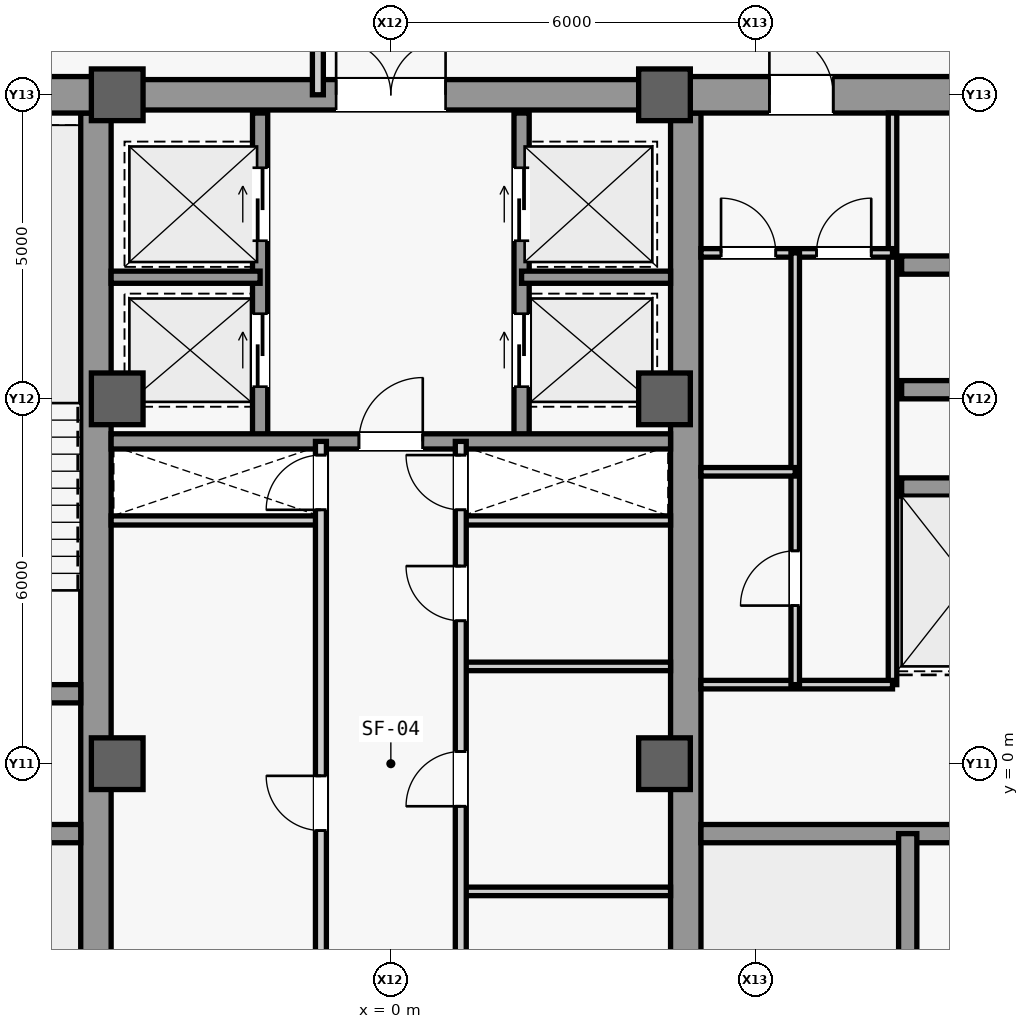
"""IFC4 building model, lengths in metres.
Left out: names, types, materials, properties, quantities, classifications, styles, units other than length and angle.
Written with IfcOpenShell. Run it as: python <this file> out.ifc"""

import sys

from ifc_helpers import new_model, si_unit, direction, frame, frame_2d, origin, origin_2d, place, context, subcontext, project, spatial, rectangle, extrude, source, transform, mapped, element, fill, save


model = new_model("IFC4")
c1 = context("Model", 3, precision=1e-05, world=origin(), true_north=direction((0.0, 1.0)))
c2 = subcontext(c1, "Body", "Model", "MODEL_VIEW")
j1 = project(units=[si_unit("LENGTHUNIT", "METRE"), si_unit("PLANEANGLEUNIT", "RADIAN")], contexts=[c1])
p1 = place(None, origin())
s1 = spatial("IfcSite", under=j1, at=p1, CompositionType="ELEMENT")
p2 = place(p1, origin())
s2 = spatial("IfcBuilding", under=s1, at=p2, CompositionType="ELEMENT")
p3 = place(p2, frame((0.0, 0.0, 223.1)))
s3 = spatial("IfcBuildingStorey", under=s2, at=p3, CompositionType="ELEMENT", Elevation=223.1)
m1 = source(origin(), c2, "Body", "SweptSolid", [
    extrude(rectangle(XDim=21.4, YDim=0.5, at=frame_2d((10.7, 0.0))), origin(), (0.0, 0.0, 1.0), 3.78),
])
for number, where, z_axis, x_axis in (
    (1, (-4.85, -10.7, 0.0), (0.0, 0.0, 1.0), (0.0, 1.0, 0.0)),
    (2, (4.85, -10.7, 0.0), (0.0, 0.0, 1.0), (0.0, 1.0, 0.0)),
):
    element("IfcWall", number, at=place(p3, frame(where, z_axis=z_axis, x_axis=x_axis)), inside=s3, PredefinedType="SHEAR", context=c2, shape_type="MappedRepresentation", body=[
        mapped(m1, transform((0.0, 0.0, 0.0), scale=1.0)),
    ])
m2 = source(origin(), c2, "Body", "SweptSolid", [
    extrude(rectangle(XDim=5.9, YDim=0.6, at=frame_2d((2.95, 0.0))), origin(), (0.0, 0.0, 1.0), 3.78),
])
p4 = place(p3, frame((-10.75, 11.0, 0.0), z_axis=(0.0, 0.0, 1.0), x_axis=(1.0, 0.0, 0.0)))
e3 = element("IfcWall", 3, at=p4, inside=s3, PredefinedType="SHEAR", context=c2, shape_type="MappedRepresentation", body=[
    mapped(m2, transform((0.0, 0.0, 0.0), scale=1.0)),
])
p5 = place(p3, frame((4.85, 11.0, 0.0), z_axis=(0.0, 0.0, 1.0), x_axis=(1.0, 0.0, 0.0)))
e4 = element("IfcWall", 4, at=p5, inside=s3, PredefinedType="SHEAR", context=c2, shape_type="MappedRepresentation", body=[
    mapped(m2, transform((0.0, 0.0, 0.0), scale=1.0)),
])
m3 = source(origin(), c2, "Body", "SweptSolid", [
    extrude(rectangle(XDim=1.05, YDim=2.2, at=frame_2d((0.525, 1.1))), frame((0.0, 0.31, 0.0), z_axis=(0.0, -1.0, 0.0), x_axis=(1.0, 0.0, 0.0)), (0.0, 0.0, 1.0), 0.62),
])
p6 = place(p5, frame((1.375, 0.0, 0.0)))
e5 = element("IfcOpeningElement", 5, at=p6, cuts=e4, PredefinedType="OPENING", context=c2, shape_type="MappedRepresentation", body=[
    mapped(m3, transform((0.0, 0.0, 0.0), scale=1.0)),
])
m4 = source(origin(), c2, "Body", "SweptSolid", [
    extrude(rectangle(XDim=5.65, YDim=0.3, at=frame_2d((2.825, 0.0))), origin(), (0.0, 0.0, 1.0), 3.78),
])
for number, where, z_axis, x_axis in (
    (6, (-10.75, -1.15, 0.0), (0.0, 0.0, 1.0), (1.0, 0.0, 0.0)),
    (7, (-10.75, 1.15, 0.0), (0.0, 0.0, 1.0), (1.0, 0.0, 0.0)),
    (8, (5.1, -1.15, 0.0), (0.0, 0.0, 1.0), (1.0, 0.0, 0.0)),
):
    element("IfcWall", number, at=place(p3, frame(where, z_axis=z_axis, x_axis=x_axis)), inside=s3, PredefinedType="SHEAR", context=c2, shape_type="MappedRepresentation", body=[
        mapped(m4, transform((0.0, 0.0, 0.0), scale=1.0)),
    ])
m5 = source(origin(), c2, "Body", "SweptSolid", [
    extrude(rectangle(XDim=9.2, YDim=0.5, at=frame_2d((4.6, 0.0))), origin(), (0.0, 0.0, 1.0), 3.78),
])
p7 = place(p3, frame((-4.6, 11.0, 0.0), z_axis=(0.0, 0.0, 1.0), x_axis=(1.0, 0.0, 0.0)))
e9 = element("IfcWall", 9, at=p7, inside=s3, PredefinedType="SHEAR", context=c2, shape_type="MappedRepresentation", body=[
    mapped(m5, transform((0.0, 0.0, 0.0), scale=1.0)),
])
m6 = source(origin(), c2, "Body", "SweptSolid", [
    extrude(rectangle(XDim=1.8, YDim=2.25, at=frame_2d((0.9, 1.125))), frame((0.0, 0.26, 0.0), z_axis=(0.0, -1.0, 0.0), x_axis=(1.0, 0.0, 0.0)), (0.0, 0.0, 1.0), 0.52),
])
p8 = place(p7, frame((3.7, 0.0, 0.0)))
e10 = element("IfcOpeningElement", 10, at=p8, cuts=e9, PredefinedType="OPENING", context=c2, shape_type="MappedRepresentation", body=[
    mapped(m6, transform((0.0, 0.0, 0.0), scale=1.0)),
])
m7 = source(origin(), c2, "Body", "SweptSolid", [
    extrude(rectangle(XDim=0.85, YDim=0.85, at=origin_2d()), origin(), (0.0, 0.0, 1.0), 4.0),
])
for number, where, z_axis, x_axis in (
    (11, (-4.5, 0.0, 0.0), (0.0, 0.0, 1.0), (1.0, 0.0, 0.0)),
    (12, (-4.5, 6.0, 0.0), (0.0, 0.0, 1.0), (1.0, 0.0, 0.0)),
    (13, (-4.5, 11.0, 0.0), (0.0, 0.0, 1.0), (1.0, 0.0, 0.0)),
    (14, (4.5, 0.0, 0.0), (0.0, 0.0, 1.0), (1.0, 0.0, 0.0)),
    (15, (4.5, 6.0, 0.0), (0.0, 0.0, 1.0), (1.0, 0.0, 0.0)),
    (16, (4.5, 11.0, 0.0), (0.0, 0.0, 1.0), (1.0, 0.0, 0.0)),
):
    element("IfcColumn", number, at=place(p3, frame(where, z_axis=z_axis, x_axis=x_axis)), inside=s3, PredefinedType="COLUMN", context=c2, shape_type="MappedRepresentation", body=[
        mapped(m7, transform((0.0, 0.0, 0.0), scale=1.0)),
    ])
m8 = source(origin(), c2, "Body", "SweptSolid", [
    extrude(rectangle(XDim=7.8, YDim=0.3, at=frame_2d((3.9, 0.0))), origin(), (0.0, 0.0, 1.0), 3.78),
])
p9 = place(p3, frame((8.5, -8.95, 0.0), z_axis=(0.0, 0.0, 1.0), x_axis=(0.0, 1.0, 0.0)))
e17 = element("IfcWall", 17, at=p9, inside=s3, PredefinedType="SHEAR", context=c2, shape_type="MappedRepresentation", body=[
    mapped(m8, transform((0.0, 0.0, 0.0), scale=1.0)),
])
m9 = source(origin(), c2, "Body", "SweptSolid", [
    extrude(rectangle(XDim=2.3, YDim=0.3, at=frame_2d((1.15, 0.0))), origin(), (0.0, 0.0, 1.0), 3.78),
])
for number, where, z_axis, x_axis in (
    (18, (8.4, 4.55, 0.0), (0.0, 0.0, 1.0), (1.0, 0.0, 0.0)),
    (19, (8.4, 6.15, 0.0), (0.0, 0.0, 1.0), (1.0, 0.0, 0.0)),
    (20, (8.4, 8.2, 0.0), (0.0, 0.0, 1.0), (1.0, 0.0, 0.0)),
):
    element("IfcWall", number, at=place(p3, frame(where, z_axis=z_axis, x_axis=x_axis)), inside=s3, PredefinedType="SHEAR", context=c2, shape_type="MappedRepresentation", body=[
        mapped(m9, transform((0.0, 0.0, 0.0), scale=1.0)),
    ])
m10 = source(origin(), c2, "Body", "SweptSolid", [
    extrude(rectangle(XDim=9.4, YDim=0.14, at=frame_2d((4.7, 0.0))), origin(), (0.0, 0.0, 1.0), 3.78),
])
p10 = place(p3, frame((8.25, 1.3, 0.0), z_axis=(0.0, 0.0, 1.0), x_axis=(0.0, 1.0, 0.0)))
e21 = element("IfcWall", 21, at=p10, inside=s3, PredefinedType="PARTITIONING", context=c2, shape_type="MappedRepresentation", body=[
    mapped(m10, transform((0.0, 0.0, 0.0), scale=1.0)),
])
m11 = source(origin(), c2, "Body", "SweptSolid", [
    extrude(rectangle(XDim=3.15, YDim=0.14, at=frame_2d((1.575, 0.0))), origin(), (0.0, 0.0, 1.0), 3.78),
])
p11 = place(p3, frame((5.1, 1.3, 0.0), z_axis=(0.0, 0.0, 1.0), x_axis=(1.0, 0.0, 0.0)))
e22 = element("IfcWall", 22, at=p11, inside=s3, PredefinedType="PARTITIONING", context=c2, shape_type="MappedRepresentation", body=[
    mapped(m11, transform((0.0, 0.0, 0.0), scale=1.0)),
])
p12 = place(p3, frame((5.1, 8.4, 0.0), z_axis=(0.0, 0.0, 1.0), x_axis=(1.0, 0.0, 0.0)))
e23 = element("IfcWall", 23, at=p12, inside=s3, PredefinedType="PARTITIONING", context=c2, shape_type="MappedRepresentation", body=[
    mapped(m11, transform((0.0, 0.0, 0.0), scale=1.0)),
])
m12 = source(origin(), c2, "Body", "SweptSolid", [
    extrude(rectangle(XDim=0.9, YDim=2.15, at=frame_2d((0.45, 1.075))), frame((0.0, 0.08, 0.0), z_axis=(0.0, -1.0, 0.0), x_axis=(1.0, 0.0, 0.0)), (0.0, 0.0, 1.0), 0.16),
])
p13 = place(p12, frame((0.33, 0.0, 0.0)))
e24 = element("IfcOpeningElement", 24, at=p13, cuts=e23, PredefinedType="OPENING", context=c2, shape_type="MappedRepresentation", body=[
    mapped(m12, transform((0.0, 0.0, 0.0), scale=1.0)),
])
p14 = place(p12, frame((1.9, 0.0, 0.0)))
e25 = element("IfcOpeningElement", 25, at=p14, cuts=e23, PredefinedType="OPENING", context=c2, shape_type="MappedRepresentation", body=[
    mapped(m12, transform((0.0, 0.0, 0.0), scale=1.0)),
])
m13 = source(origin(), c2, "Body", "SweptSolid", [
    extrude(rectangle(XDim=7.1, YDim=0.14, at=frame_2d((3.55, 0.0))), origin(), (0.0, 0.0, 1.0), 3.78),
])
p15 = place(p3, frame((6.65, 1.3, 0.0), z_axis=(0.0, 0.0, 1.0), x_axis=(0.0, 1.0, 0.0)))
e26 = element("IfcWall", 26, at=p15, inside=s3, PredefinedType="PARTITIONING", context=c2, shape_type="MappedRepresentation", body=[
    mapped(m13, transform((0.0, 0.0, 0.0), scale=1.0)),
])
p16 = place(p15, frame((1.3, 0.0, 0.0)))
e27 = element("IfcOpeningElement", 27, at=p16, cuts=e26, PredefinedType="OPENING", context=c2, shape_type="MappedRepresentation", body=[
    mapped(m12, transform((0.0, 0.0, 0.0), scale=1.0)),
])
m14 = source(origin(), c2, "Body", "SweptSolid", [
    extrude(rectangle(XDim=1.55, YDim=0.14, at=frame_2d((0.775, 0.0))), origin(), (0.0, 0.0, 1.0), 3.78),
])
p17 = place(p3, frame((5.1, 4.8, 0.0), z_axis=(0.0, 0.0, 1.0), x_axis=(1.0, 0.0, 0.0)))
e28 = element("IfcWall", 28, at=p17, inside=s3, PredefinedType="PARTITIONING", context=c2, shape_type="MappedRepresentation", body=[
    mapped(m14, transform((0.0, 0.0, 0.0), scale=1.0)),
])
m15 = source(origin(), c2, "Body", "SweptSolid", [
    extrude(rectangle(XDim=3.45, YDim=0.15, at=frame_2d((1.725, 0.0))), origin(), (0.0, 0.0, 1.0), 3.78),
])
for number, where, z_axis, x_axis in (
    (29, (-4.6, 4.0, 0.0), (0.0, 0.0, 1.0), (1.0, 0.0, 0.0)),
    (30, (1.15, 4.0, 0.0), (0.0, 0.0, 1.0), (1.0, 0.0, 0.0)),
):
    element("IfcWall", number, at=place(p3, frame(where, z_axis=z_axis, x_axis=x_axis)), inside=s3, PredefinedType="PARTITIONING", context=c2, shape_type="MappedRepresentation", body=[
        mapped(m15, transform((0.0, 0.0, 0.0), scale=1.0)),
    ])
m16 = source(origin(), c2, "Body", "SweptSolid", [
    extrude(rectangle(XDim=5.4, YDim=0.25, at=frame_2d((2.7, 0.0))), origin(), (0.0, 0.0, 1.0), 3.78),
])
p18 = place(p3, frame((-2.15, 5.3, 0.0), z_axis=(0.0, 0.0, 1.0), x_axis=(0.0, 1.0, 0.0)))
e31 = element("IfcWall", 31, at=p18, inside=s3, PredefinedType="SHEAR", context=c2, shape_type="MappedRepresentation", body=[
    mapped(m16, transform((0.0, 0.0, 0.0), scale=1.0)),
])
m17 = source(origin(), c2, "Body", "SweptSolid", [
    extrude(rectangle(XDim=1.2, YDim=2.3, at=frame_2d((0.6, 1.15))), frame((0.0, 0.135, 0.0), z_axis=(0.0, -1.0, 0.0), x_axis=(1.0, 0.0, 0.0)), (0.0, 0.0, 1.0), 0.27),
])
p19 = place(p18, frame((3.3, 0.0, 0.0)))
e32 = element("IfcOpeningElement", 32, at=p19, cuts=e31, PredefinedType="OPENING", context=c2, shape_type="MappedRepresentation", body=[
    mapped(m17, transform((0.0, 0.0, 0.0), scale=1.0)),
])
p20 = place(p18, frame((0.9, 0.0, 0.0)))
e33 = element("IfcOpeningElement", 33, at=p20, cuts=e31, PredefinedType="OPENING", context=c2, shape_type="MappedRepresentation", body=[
    mapped(m17, transform((0.0, 0.0, 0.0), scale=1.0)),
])
p21 = place(p3, frame((2.15, 5.3, 0.0), z_axis=(0.0, 0.0, 1.0), x_axis=(0.0, 1.0, 0.0)))
e34 = element("IfcWall", 34, at=p21, inside=s3, PredefinedType="SHEAR", context=c2, shape_type="MappedRepresentation", body=[
    mapped(m16, transform((0.0, 0.0, 0.0), scale=1.0)),
])
p22 = place(p21, frame((3.3, 0.0, 0.0)))
e35 = element("IfcOpeningElement", 35, at=p22, cuts=e34, PredefinedType="OPENING", context=c2, shape_type="MappedRepresentation", body=[
    mapped(m17, transform((0.0, 0.0, 0.0), scale=1.0)),
])
p23 = place(p21, frame((0.9, 0.0, 0.0)))
e36 = element("IfcOpeningElement", 36, at=p23, cuts=e34, PredefinedType="OPENING", context=c2, shape_type="MappedRepresentation", body=[
    mapped(m17, transform((0.0, 0.0, 0.0), scale=1.0)),
])
m18 = source(origin(), c2, "Body", "SweptSolid", [
    extrude(rectangle(XDim=2.45, YDim=0.2, at=frame_2d((1.225, 0.0))), origin(), (0.0, 0.0, 1.0), 3.78),
])
for number, where, z_axis, x_axis in (
    (37, (-4.6, 8.0, 0.0), (0.0, 0.0, 1.0), (1.0, 0.0, 0.0)),
    (38, (2.15, 8.0, 0.0), (0.0, 0.0, 1.0), (1.0, 0.0, 0.0)),
):
    element("IfcWall", number, at=place(p3, frame(where, z_axis=z_axis, x_axis=x_axis)), inside=s3, PredefinedType="SHEAR", context=c2, shape_type="MappedRepresentation", body=[
        mapped(m18, transform((0.0, 0.0, 0.0), scale=1.0)),
    ])
m19 = source(origin(), c2, "Body", "SweptSolid", [
    extrude(rectangle(XDim=9.2, YDim=0.25, at=frame_2d((4.6, 0.0))), origin(), (0.0, 0.0, 1.0), 3.78),
])
p24 = place(p3, frame((-4.6, 5.3, 0.0), z_axis=(0.0, 0.0, 1.0), x_axis=(1.0, 0.0, 0.0)))
e39 = element("IfcWall", 39, at=p24, inside=s3, PredefinedType="SHEAR", context=c2, shape_type="MappedRepresentation", body=[
    mapped(m19, transform((0.0, 0.0, 0.0), scale=1.0)),
])
m20 = source(origin(), c2, "Body", "SweptSolid", [
    extrude(rectangle(XDim=1.05, YDim=2.2, at=frame_2d((0.525, 1.1))), frame((0.0, 0.135, 0.0), z_axis=(0.0, -1.0, 0.0), x_axis=(1.0, 0.0, 0.0)), (0.0, 0.0, 1.0), 0.27),
])
p25 = place(p24, frame((4.075, 0.0, 0.0)))
e40 = element("IfcOpeningElement", 40, at=p25, cuts=e39, PredefinedType="OPENING", context=c2, shape_type="MappedRepresentation", body=[
    mapped(m20, transform((0.0, 0.0, 0.0), scale=1.0)),
])
m21 = source(origin(), c2, "Body", "SweptSolid", [
    extrude(rectangle(XDim=10.6, YDim=0.18, at=frame_2d((5.3, 0.0))), origin(), (0.0, 0.0, 1.0), 3.78),
])
p26 = place(p3, frame((-1.15, -5.3, 0.0), z_axis=(0.0, 0.0, 1.0), x_axis=(0.0, 1.0, 0.0)))
e41 = element("IfcWall", 41, at=p26, inside=s3, PredefinedType="PARTITIONING", context=c2, shape_type="MappedRepresentation", body=[
    mapped(m21, transform((0.0, 0.0, 0.0), scale=1.0)),
])
m22 = source(origin(), c2, "Body", "SweptSolid", [
    extrude(rectangle(XDim=0.9, YDim=2.15, at=frame_2d((0.45, 1.075))), frame((0.0, 0.1, 0.0), z_axis=(0.0, -1.0, 0.0), x_axis=(1.0, 0.0, 0.0)), (0.0, 0.0, 1.0), 0.2),
])
p27 = place(p26, frame((4.2, 0.0, 0.0)))
e42 = element("IfcOpeningElement", 42, at=p27, cuts=e41, PredefinedType="OPENING", context=c2, shape_type="MappedRepresentation", body=[
    mapped(m22, transform((0.0, 0.0, 0.0), scale=1.0)),
])
p28 = place(p26, frame((9.475, 0.0, 0.0)))
e43 = element("IfcOpeningElement", 43, at=p28, cuts=e41, PredefinedType="OPENING", context=c2, shape_type="MappedRepresentation", body=[
    mapped(m22, transform((0.0, 0.0, 0.0), scale=1.0)),
])
m23 = source(origin(), c2, "Body", "SweptSolid", [
    extrude(rectangle(XDim=3.45, YDim=0.14, at=frame_2d((1.725, 0.0))), origin(), (0.0, 0.0, 1.0), 3.78),
])
for number, where, z_axis, x_axis in (
    (44, (1.15, -2.1, 0.0), (0.0, 0.0, 1.0), (1.0, 0.0, 0.0)),
    (45, (1.15, 1.6, 0.0), (0.0, 0.0, 1.0), (1.0, 0.0, 0.0)),
):
    element("IfcWall", number, at=place(p3, frame(where, z_axis=z_axis, x_axis=x_axis)), inside=s3, PredefinedType="PARTITIONING", context=c2, shape_type="MappedRepresentation", body=[
        mapped(m23, transform((0.0, 0.0, 0.0), scale=1.0)),
    ])
p29 = place(p3, frame((1.15, -5.3, 0.0), z_axis=(0.0, 0.0, 1.0), x_axis=(0.0, 1.0, 0.0)))
e46 = element("IfcWall", 46, at=p29, inside=s3, PredefinedType="PARTITIONING", context=c2, shape_type="MappedRepresentation", body=[
    mapped(m21, transform((0.0, 0.0, 0.0), scale=1.0)),
])
p30 = place(p29, frame((1.15, 0.0, 0.0)))
e47 = element("IfcOpeningElement", 47, at=p30, cuts=e46, PredefinedType="OPENING", context=c2, shape_type="MappedRepresentation", body=[
    mapped(m22, transform((0.0, 0.0, 0.0), scale=1.0)),
])
p31 = place(p29, frame((4.6, 0.0, 0.0)))
e48 = element("IfcOpeningElement", 48, at=p31, cuts=e46, PredefinedType="OPENING", context=c2, shape_type="MappedRepresentation", body=[
    mapped(m22, transform((0.0, 0.0, 0.0), scale=1.0)),
])
p32 = place(p29, frame((7.65, 0.0, 0.0)))
e49 = element("IfcOpeningElement", 49, at=p32, cuts=e46, PredefinedType="OPENING", context=c2, shape_type="MappedRepresentation", body=[
    mapped(m22, transform((0.0, 0.0, 0.0), scale=1.0)),
])
p33 = place(p29, frame((9.475, 0.0, 0.0)))
e50 = element("IfcOpeningElement", 50, at=p33, cuts=e46, PredefinedType="OPENING", context=c2, shape_type="MappedRepresentation", body=[
    mapped(m22, transform((0.0, 0.0, 0.0), scale=1.0)),
])
m24 = source(origin(), c2, "Body", "SweptSolid", [
    extrude(rectangle(XDim=3.1, YDim=0.18, at=frame_2d((1.55, 0.0))), origin(), (0.0, 0.0, 1.0), 3.78),
])
p34 = place(p3, frame((-1.2, 11.0, 0.0), z_axis=(0.0, 0.0, 1.0), x_axis=(0.0, 1.0, 0.0)))
e51 = element("IfcWall", 51, at=p34, inside=s3, PredefinedType="PARTITIONING", context=c2, shape_type="MappedRepresentation", body=[
    mapped(m24, transform((0.0, 0.0, 0.0), scale=1.0)),
])
m25 = source(origin(), c2, "Body", "SweptSolid", [
    extrude(rectangle(XDim=1.05, YDim=2.2, at=frame_2d((0.525, 1.1))), frame((0.0, 0.025, 0.0), z_axis=(0.0, -1.0, 0.0), x_axis=(1.0, 0.0, 0.0)), (0.0, 0.0, 1.0), 0.05),
])
p35 = place(p6, origin())
e52 = element("IfcDoor", 52, at=p35, inside=s3, OperationType="SINGLE_SWING_LEFT", PredefinedType="DOOR", context=c2, shape_type="MappedRepresentation", body=[
    mapped(m25, transform((0.0, 0.0, 0.0), scale=1.0)),
])
fill(e5, e52)
m26 = source(origin(), c2, "Body", "SweptSolid", [
    extrude(rectangle(XDim=0.9, YDim=2.15, at=frame_2d((0.45, 1.075))), frame((0.0, 0.025, 0.0), z_axis=(0.0, -1.0, 0.0), x_axis=(1.0, 0.0, 0.0)), (0.0, 0.0, 1.0), 0.05),
])
p36 = place(p13, origin())
e53 = element("IfcDoor", 53, at=p36, inside=s3, OperationType="SINGLE_SWING_LEFT", PredefinedType="DOOR", context=c2, shape_type="MappedRepresentation", body=[
    mapped(m26, transform((0.0, 0.0, 0.0), scale=1.0)),
])
fill(e24, e53)
p37 = place(p14, origin())
e54 = element("IfcDoor", 54, at=p37, inside=s3, OperationType="SINGLE_SWING_RIGHT", PredefinedType="DOOR", context=c2, shape_type="MappedRepresentation", body=[
    mapped(m26, transform((0.0, 0.0, 0.0), scale=1.0)),
])
fill(e25, e54)
p38 = place(p16, origin())
e55 = element("IfcDoor", 55, at=p38, inside=s3, OperationType="SINGLE_SWING_LEFT", PredefinedType="DOOR", context=c2, shape_type="MappedRepresentation", body=[
    mapped(m26, transform((0.0, 0.0, 0.0), scale=1.0)),
])
fill(e27, e55)
p39 = place(p25, origin())
e56 = element("IfcDoor", 56, at=p39, inside=s3, OperationType="SINGLE_SWING_RIGHT", PredefinedType="DOOR", context=c2, shape_type="MappedRepresentation", body=[
    mapped(m25, transform((0.0, 0.0, 0.0), scale=1.0)),
])
fill(e40, e56)
m27 = source(origin(), c2, "Body", "SweptSolid", [
    extrude(rectangle(XDim=1.8, YDim=2.25, at=frame_2d((0.9, 1.125))), frame((0.0, 0.025, 0.0), z_axis=(0.0, -1.0, 0.0), x_axis=(1.0, 0.0, 0.0)), (0.0, 0.0, 1.0), 0.05),
])
p40 = place(p8, origin())
e57 = element("IfcDoor", 57, at=p40, inside=s3, OperationType="SINGLE_SWING_RIGHT", PredefinedType="DOOR", context=c2, shape_type="MappedRepresentation", body=[
    mapped(m27, transform((0.0, 0.0, 0.0), scale=1.0)),
])
fill(e10, e57)
p41 = place(p27, origin())
e58 = element("IfcDoor", 58, at=p41, inside=s3, OperationType="SINGLE_SWING_RIGHT", PredefinedType="DOOR", context=c2, shape_type="MappedRepresentation", body=[
    mapped(m26, transform((0.0, 0.0, 0.0), scale=1.0)),
])
fill(e42, e58)
p42 = place(p31, origin())
e59 = element("IfcDoor", 59, at=p42, inside=s3, OperationType="SINGLE_SWING_LEFT", PredefinedType="DOOR", context=c2, shape_type="MappedRepresentation", body=[
    mapped(m26, transform((0.0, 0.0, 0.0), scale=1.0)),
])
fill(e48, e59)
p43 = place(p32, origin())
e60 = element("IfcDoor", 60, at=p43, inside=s3, OperationType="SINGLE_SWING_RIGHT", PredefinedType="DOOR", context=c2, shape_type="MappedRepresentation", body=[
    mapped(m26, transform((0.0, 0.0, 0.0), scale=1.0)),
])
fill(e49, e60)
p44 = place(p28, origin())
e61 = element("IfcDoor", 61, at=p44, inside=s3, OperationType="SINGLE_SWING_LEFT", PredefinedType="DOOR", context=c2, shape_type="MappedRepresentation", body=[
    mapped(m26, transform((0.0, 0.0, 0.0), scale=1.0)),
])
fill(e43, e61)
p45 = place(p33, origin())
e62 = element("IfcDoor", 62, at=p45, inside=s3, OperationType="SINGLE_SWING_RIGHT", PredefinedType="DOOR", context=c2, shape_type="MappedRepresentation", body=[
    mapped(m26, transform((0.0, 0.0, 0.0), scale=1.0)),
])
fill(e50, e62)
m28 = source(origin(), c2, "Body", "SweptSolid", [
    extrude(rectangle(XDim=1.2, YDim=2.3, at=frame_2d((0.6, 1.15))), frame((0.0, 0.025, 0.0), z_axis=(0.0, -1.0, 0.0), x_axis=(1.0, 0.0, 0.0)), (0.0, 0.0, 1.0), 0.05),
])
p46 = place(p19, origin())
e63 = element("IfcDoor", 63, at=p46, inside=s3, OperationType="SLIDING_TO_LEFT", PredefinedType="DOOR", context=c2, shape_type="MappedRepresentation", body=[
    mapped(m28, transform((0.0, 0.0, 0.0), scale=1.0)),
])
fill(e32, e63)
p47 = place(p22, origin())
e64 = element("IfcDoor", 64, at=p47, inside=s3, OperationType="SLIDING_TO_LEFT", PredefinedType="DOOR", context=c2, shape_type="MappedRepresentation", body=[
    mapped(m28, transform((0.0, 0.0, 0.0), scale=1.0)),
])
fill(e35, e64)
p48 = place(p20, origin())
e65 = element("IfcDoor", 65, at=p48, inside=s3, OperationType="SLIDING_TO_LEFT", PredefinedType="DOOR", context=c2, shape_type="MappedRepresentation", body=[
    mapped(m28, transform((0.0, 0.0, 0.0), scale=1.0)),
])
fill(e33, e65)
p49 = place(p23, origin())
e66 = element("IfcDoor", 66, at=p49, inside=s3, OperationType="SLIDING_TO_LEFT", PredefinedType="DOOR", context=c2, shape_type="MappedRepresentation", body=[
    mapped(m28, transform((0.0, 0.0, 0.0), scale=1.0)),
])
fill(e36, e66)
save(model, sys.argv[1])
